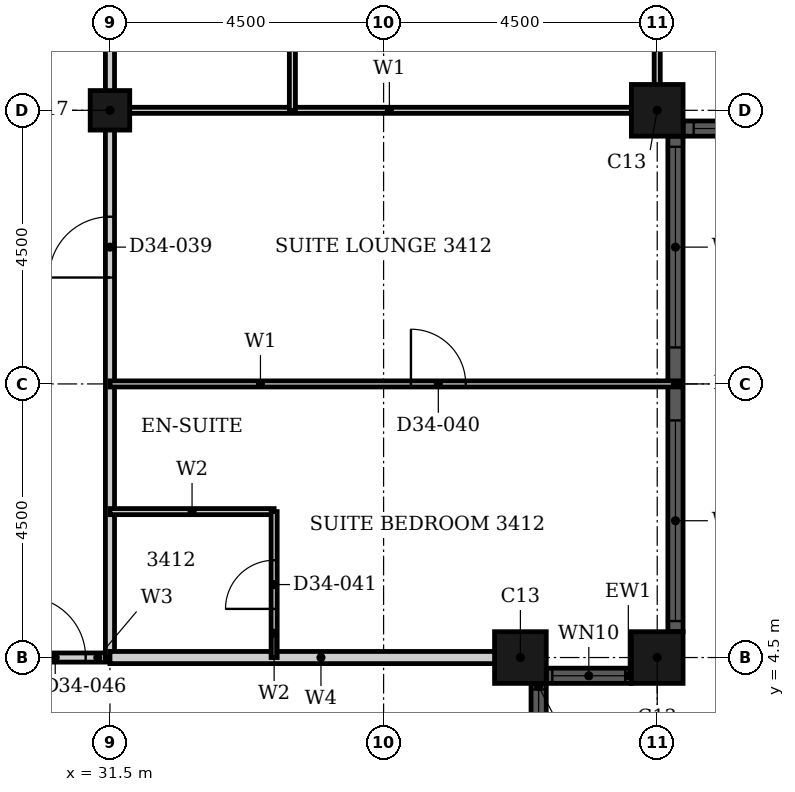
"""IFC4 building model, lengths in metres.
Left out: names, types, materials, properties, quantities, classifications, styles, units other than length and angle.
Written with IfcOpenShell. Run it as: python <this file> out.ifc"""

import sys

from ifc_helpers import new_model, si_unit, direction, frame, frame_2d, origin, origin_2d, place, context, subcontext, project, spatial, rectangle, hollow_rectangle, extrude, element, fill, save


model = new_model("IFC4")
c1 = context("Model", 3, precision=1e-05, world=origin(), true_north=direction((0.0, 1.0)))
c2 = subcontext(c1, "Body", "Model", "MODEL_VIEW")
j1 = project(units=[si_unit("LENGTHUNIT", "METRE"), si_unit("PLANEANGLEUNIT", "RADIAN")], contexts=[c1])
p1 = place(None, origin())
s1 = spatial("IfcSite", under=j1, at=p1, CompositionType="ELEMENT")
p2 = place(p1, origin())
s2 = spatial("IfcBuilding", under=s1, at=p2, CompositionType="ELEMENT")
p3 = place(p2, frame((0.0, 0.0, 136.8)))
s3 = spatial("IfcBuildingStorey", under=s2, at=p3, CompositionType="ELEMENT", Elevation=136.8)
for number, where, z_axis, x_axis in (
    (1, (38.25, 4.5, 0.0), (0.0, 0.0, 1.0), (1.0, 0.0, 0.0)),
    (2, (40.5, 4.5, 0.0), (0.0, 0.0, 1.0), (1.0, 0.0, 0.0)),
    (3, (40.5, 13.5, 0.0), (0.0, 0.0, 1.0), (1.0, 0.0, 0.0)),
):
    element("IfcColumn", number, at=place(p3, frame(where, z_axis=z_axis, x_axis=x_axis)), inside=s3, PredefinedType="COLUMN", context=c2, shape_type="SweptSolid", body=[
        extrude(hollow_rectangle(XDim=0.85, YDim=0.85, WallThickness=0.026, at=origin_2d()), origin(), (0.0, 0.0, 1.0), 3.6),
    ])
p4 = place(p3, frame((31.5, 13.5, 0.0), z_axis=(0.0, 0.0, 1.0), x_axis=(1.0, 0.0, 0.0)))
e4 = element("IfcColumn", 4, at=p4, inside=s3, PredefinedType="COLUMN", context=c2, shape_type="SweptSolid", body=[
    extrude(hollow_rectangle(XDim=0.65, YDim=0.65, WallThickness=0.021, at=origin_2d()), origin(), (0.0, 0.0, 1.0), 3.6),
])
p5 = place(p3, frame((38.55, 2.675, 0.0), z_axis=(0.0, 0.0, 1.0), x_axis=(0.0, 1.0, 0.0)))
e5 = element("IfcWall", 5, at=p5, inside=s3, PredefinedType="SOLIDWALL", context=c2, shape_type="SweptSolid", body=[
    extrude(rectangle(XDim=1.4, YDim=0.25, at=frame_2d((0.7, 0.0))), origin(), (0.0, 0.0, 1.0), 3.6),
])
p6 = place(p5, frame((0.1, 0.0, 0.9)))
e6 = element("IfcOpeningElement", 6, at=p6, cuts=e5, PredefinedType="OPENING", context=c2, shape_type="SweptSolid", body=[
    extrude(rectangle(XDim=1.2, YDim=1.85, at=frame_2d((0.6, 0.925))), frame((0.0, 0.135, 0.0), z_axis=(0.0, -1.0, 0.0), x_axis=(1.0, 0.0, 0.0)), (0.0, 0.0, 1.0), 0.27),
])
p7 = place(p3, frame((38.675, 4.2, 0.0), z_axis=(0.0, 0.0, 1.0), x_axis=(1.0, 0.0, 0.0)))
e7 = element("IfcWall", 7, at=p7, inside=s3, PredefinedType="SOLIDWALL", context=c2, shape_type="SweptSolid", body=[
    extrude(rectangle(XDim=1.4, YDim=0.25, at=frame_2d((0.7, 0.0))), origin(), (0.0, 0.0, 1.0), 3.6),
])
p8 = place(p7, frame((0.1, 0.0, 0.9)))
e8 = element("IfcOpeningElement", 8, at=p8, cuts=e7, PredefinedType="OPENING", context=c2, shape_type="SweptSolid", body=[
    extrude(rectangle(XDim=1.2, YDim=1.85, at=frame_2d((0.6, 0.925))), frame((0.0, 0.135, 0.0), z_axis=(0.0, -1.0, 0.0), x_axis=(1.0, 0.0, 0.0)), (0.0, 0.0, 1.0), 0.27),
])
p9 = place(p3, frame((40.8, 4.925, 0.0), z_axis=(0.0, 0.0, 1.0), x_axis=(0.0, 1.0, 0.0)))
e9 = element("IfcWall", 9, at=p9, inside=s3, PredefinedType="SOLIDWALL", context=c2, shape_type="SweptSolid", body=[
    extrude(rectangle(XDim=8.15, YDim=0.25, at=frame_2d((4.075, 0.0))), origin(), (0.0, 0.0, 1.0), 3.6),
])
p10 = place(p9, frame((0.175, 0.0, 0.9)))
e10 = element("IfcOpeningElement", 10, at=p10, cuts=e9, PredefinedType="OPENING", context=c2, shape_type="SweptSolid", body=[
    extrude(rectangle(XDim=3.3, YDim=1.85, at=frame_2d((1.65, 0.925))), frame((0.0, 0.135, 0.0), z_axis=(0.0, -1.0, 0.0), x_axis=(1.0, 0.0, 0.0)), (0.0, 0.0, 1.0), 0.27),
])
p11 = place(p9, frame((4.675, 0.0, 0.9)))
e11 = element("IfcOpeningElement", 11, at=p11, cuts=e9, PredefinedType="OPENING", context=c2, shape_type="SweptSolid", body=[
    extrude(rectangle(XDim=3.3, YDim=1.85, at=frame_2d((1.65, 0.925))), frame((0.0, 0.135, 0.0), z_axis=(0.0, -1.0, 0.0), x_axis=(1.0, 0.0, 0.0)), (0.0, 0.0, 1.0), 0.27),
])
p12 = place(p3, frame((40.925, 13.2, 0.0), z_axis=(0.0, 0.0, 1.0), x_axis=(1.0, 0.0, 0.0)))
e12 = element("IfcWall", 12, at=p12, inside=s3, PredefinedType="SOLIDWALL", context=c2, shape_type="SweptSolid", body=[
    extrude(rectangle(XDim=3.65, YDim=0.25, at=frame_2d((1.825, 0.0))), origin(), (0.0, 0.0, 1.0), 3.6),
])
p13 = place(p12, frame((0.175, 0.0, 0.9)))
e13 = element("IfcOpeningElement", 13, at=p13, cuts=e12, PredefinedType="OPENING", context=c2, shape_type="SweptSolid", body=[
    extrude(rectangle(XDim=3.3, YDim=1.85, at=frame_2d((1.65, 0.925))), frame((0.0, 0.135, 0.0), z_axis=(0.0, -1.0, 0.0), x_axis=(1.0, 0.0, 0.0)), (0.0, 0.0, 1.0), 0.27),
])
p14 = place(p3, frame((29.7, 4.5, 0.0), z_axis=(0.0, 0.0, 1.0), x_axis=(1.0, 0.0, 0.0)))
e14 = element("IfcWall", 14, at=p14, inside=s3, PredefinedType="PARTITIONING", context=c2, shape_type="SweptSolid", body=[
    extrude(rectangle(XDim=1.8, YDim=0.15, at=frame_2d((0.9, 0.0))), origin(), (0.0, 0.0, 1.0), 3.2),
])
p15 = place(p14, frame((0.4, 0.0, 0.0)))
e15 = element("IfcOpeningElement", 15, at=p15, cuts=e14, PredefinedType="OPENING", context=c2, shape_type="SweptSolid", body=[
    extrude(rectangle(XDim=1.0, YDim=2.1, at=frame_2d((0.5, 1.05))), frame((0.0, 0.085, 0.0), z_axis=(0.0, -1.0, 0.0), x_axis=(1.0, 0.0, 0.0)), (0.0, 0.0, 1.0), 0.17),
])
p16 = place(p3, frame((31.5, 4.5, 0.0), z_axis=(0.0, 0.0, 1.0), x_axis=(0.0, 1.0, 0.0)))
e16 = element("IfcWall", 16, at=p16, inside=s3, PredefinedType="PARTITIONING", context=c2, shape_type="SweptSolid", body=[
    extrude(rectangle(XDim=16.2, YDim=0.15, at=frame_2d((8.1, 0.0))), origin(), (0.0, 0.0, 1.0), 2.48),
])
p17 = place(p16, frame((6.25, 0.0, 0.0)))
e17 = element("IfcOpeningElement", 17, at=p17, cuts=e16, PredefinedType="OPENING", context=c2, shape_type="SweptSolid", body=[
    extrude(rectangle(XDim=1.0, YDim=2.1, at=frame_2d((0.5, 1.05))), frame((0.0, 0.085, 0.0), z_axis=(0.0, -1.0, 0.0), x_axis=(1.0, 0.0, 0.0)), (0.0, 0.0, 1.0), 0.17),
])
p18 = place(p3, frame((31.5, 13.5, 0.0), z_axis=(0.0, 0.0, 1.0), x_axis=(1.0, 0.0, 0.0)))
e18 = element("IfcWall", 18, at=p18, inside=s3, PredefinedType="PARTITIONING", context=c2, shape_type="SweptSolid", body=[
    extrude(rectangle(XDim=9.19, YDim=0.1, at=frame_2d((4.595, 0.0))), origin(), (0.0, 0.0, 1.0), 2.28),
])
p19 = place(p3, frame((31.5, 9.0, 0.0), z_axis=(0.0, 0.0, 1.0), x_axis=(1.0, 0.0, 0.0)))
e19 = element("IfcWall", 19, at=p19, inside=s3, PredefinedType="PARTITIONING", context=c2, shape_type="SweptSolid", body=[
    extrude(rectangle(XDim=9.365, YDim=0.1, at=frame_2d((4.683, 0.0))), origin(), (0.0, 0.0, 1.0), 3.2),
])
p20 = place(p19, frame((4.95, 0.0, 0.0)))
e20 = element("IfcOpeningElement", 20, at=p20, cuts=e19, PredefinedType="OPENING", context=c2, shape_type="SweptSolid", body=[
    extrude(rectangle(XDim=0.9, YDim=2.1, at=frame_2d((0.45, 1.05))), frame((0.0, 0.06, 0.0), z_axis=(0.0, -1.0, 0.0), x_axis=(1.0, 0.0, 0.0)), (0.0, 0.0, 1.0), 0.12),
])
p21 = place(p3, frame((34.5, 13.5, 0.0), z_axis=(0.0, 0.0, 1.0), x_axis=(0.0, 1.0, 0.0)))
e21 = element("IfcWall", 21, at=p21, inside=s3, PredefinedType="PARTITIONING", context=c2, shape_type="SweptSolid", body=[
    extrude(rectangle(XDim=7.2, YDim=0.1, at=frame_2d((3.6, 0.0))), origin(), (0.0, 0.0, 1.0), 3.2),
])
p22 = place(p3, frame((40.5, 13.31, 0.0), z_axis=(0.0, 0.0, 1.0), x_axis=(0.0, 1.0, 0.0)))
e22 = element("IfcWall", 22, at=p22, inside=s3, PredefinedType="PARTITIONING", context=c2, shape_type="SweptSolid", body=[
    extrude(rectangle(XDim=7.39, YDim=0.1, at=frame_2d((3.695, 0.0))), origin(), (0.0, 0.0, 1.0), 3.2),
])
p23 = place(p3, frame((31.5, 4.5, 0.0), z_axis=(0.0, 0.0, 1.0), x_axis=(1.0, 0.0, 0.0)))
e23 = element("IfcWall", 23, at=p23, inside=s3, PredefinedType="PARTITIONING", context=c2, shape_type="SweptSolid", body=[
    extrude(rectangle(XDim=6.94, YDim=0.2, at=frame_2d((3.47, 0.0))), origin(), (0.0, 0.0, 1.0), 3.2),
])
p24 = place(p3, frame((31.5, 6.9, 0.0), z_axis=(0.0, 0.0, 1.0), x_axis=(1.0, 0.0, 0.0)))
e24 = element("IfcWall", 24, at=p24, inside=s3, PredefinedType="PARTITIONING", context=c2, shape_type="SweptSolid", body=[
    extrude(rectangle(XDim=2.7, YDim=0.1, at=frame_2d((1.35, 0.0))), origin(), (0.0, 0.0, 1.0), 3.2),
])
p25 = place(p3, frame((34.2, 4.5, 0.0), z_axis=(0.0, 0.0, 1.0), x_axis=(0.0, 1.0, 0.0)))
e25 = element("IfcWall", 25, at=p25, inside=s3, PredefinedType="PARTITIONING", context=c2, shape_type="SweptSolid", body=[
    extrude(rectangle(XDim=2.4, YDim=0.1, at=frame_2d((1.2, 0.0))), origin(), (0.0, 0.0, 1.0), 3.2),
])
p26 = place(p25, frame((0.8, 0.0, 0.0)))
e26 = element("IfcOpeningElement", 26, at=p26, cuts=e25, PredefinedType="OPENING", context=c2, shape_type="SweptSolid", body=[
    extrude(rectangle(XDim=0.8, YDim=2.1, at=frame_2d((0.4, 1.05))), frame((0.0, 0.06, 0.0), z_axis=(0.0, -1.0, 0.0), x_axis=(1.0, 0.0, 0.0)), (0.0, 0.0, 1.0), 0.12),
])
p27 = place(p6, origin())
e27 = element("IfcWindow", 27, at=p27, inside=s3, PartitioningType="SINGLE_PANEL", PredefinedType="WINDOW", context=c2, shape_type="SweptSolid", body=[
    extrude(rectangle(XDim=1.2, YDim=1.85, at=frame_2d((0.6, 0.925))), frame((0.0, 0.03, 0.0), z_axis=(0.0, -1.0, 0.0), x_axis=(1.0, 0.0, 0.0)), (0.0, 0.0, 1.0), 0.06),
])
fill(e6, e27)
p28 = place(p8, origin())
e28 = element("IfcWindow", 28, at=p28, inside=s3, PartitioningType="SINGLE_PANEL", PredefinedType="WINDOW", context=c2, shape_type="SweptSolid", body=[
    extrude(rectangle(XDim=1.2, YDim=1.85, at=frame_2d((0.6, 0.925))), frame((0.0, 0.03, 0.0), z_axis=(0.0, -1.0, 0.0), x_axis=(1.0, 0.0, 0.0)), (0.0, 0.0, 1.0), 0.06),
])
fill(e8, e28)
p29 = place(p10, origin())
e29 = element("IfcWindow", 29, at=p29, inside=s3, PartitioningType="SINGLE_PANEL", PredefinedType="WINDOW", context=c2, shape_type="SweptSolid", body=[
    extrude(rectangle(XDim=3.3, YDim=1.85, at=frame_2d((1.65, 0.925))), frame((0.0, 0.03, 0.0), z_axis=(0.0, -1.0, 0.0), x_axis=(1.0, 0.0, 0.0)), (0.0, 0.0, 1.0), 0.06),
])
fill(e10, e29)
p30 = place(p11, origin())
e30 = element("IfcWindow", 30, at=p30, inside=s3, PartitioningType="SINGLE_PANEL", PredefinedType="WINDOW", context=c2, shape_type="SweptSolid", body=[
    extrude(rectangle(XDim=3.3, YDim=1.85, at=frame_2d((1.65, 0.925))), frame((0.0, 0.03, 0.0), z_axis=(0.0, -1.0, 0.0), x_axis=(1.0, 0.0, 0.0)), (0.0, 0.0, 1.0), 0.06),
])
fill(e11, e30)
p31 = place(p13, origin())
e31 = element("IfcWindow", 31, at=p31, inside=s3, PartitioningType="SINGLE_PANEL", PredefinedType="WINDOW", context=c2, shape_type="SweptSolid", body=[
    extrude(rectangle(XDim=3.3, YDim=1.85, at=frame_2d((1.65, 0.925))), frame((0.0, 0.03, 0.0), z_axis=(0.0, -1.0, 0.0), x_axis=(1.0, 0.0, 0.0)), (0.0, 0.0, 1.0), 0.06),
])
fill(e13, e31)
p32 = place(p17, origin())
e32 = element("IfcDoor", 32, at=p32, inside=s3, OperationType="SINGLE_SWING_RIGHT", PredefinedType="DOOR", context=c2, shape_type="SweptSolid", body=[
    extrude(rectangle(XDim=1.0, YDim=2.1, at=frame_2d((0.5, 1.05))), frame((0.0, 0.025, 0.0), z_axis=(0.0, -1.0, 0.0), x_axis=(1.0, 0.0, 0.0)), (0.0, 0.0, 1.0), 0.05),
])
fill(e17, e32)
p33 = place(p20, origin())
e33 = element("IfcDoor", 33, at=p33, inside=s3, OperationType="SINGLE_SWING_RIGHT", PredefinedType="DOOR", context=c2, shape_type="SweptSolid", body=[
    extrude(rectangle(XDim=0.9, YDim=2.1, at=frame_2d((0.45, 1.05))), frame((0.0, 0.025, 0.0), z_axis=(0.0, -1.0, 0.0), x_axis=(1.0, 0.0, 0.0)), (0.0, 0.0, 1.0), 0.05),
])
fill(e20, e33)
p34 = place(p26, origin())
e34 = element("IfcDoor", 34, at=p34, inside=s3, OperationType="SINGLE_SWING_LEFT", PredefinedType="DOOR", context=c2, shape_type="SweptSolid", body=[
    extrude(rectangle(XDim=0.8, YDim=2.1, at=frame_2d((0.4, 1.05))), frame((0.0, 0.025, 0.0), z_axis=(0.0, -1.0, 0.0), x_axis=(1.0, 0.0, 0.0)), (0.0, 0.0, 1.0), 0.05),
])
fill(e26, e34)
p35 = place(p15, origin())
e35 = element("IfcDoor", 35, at=p35, inside=s3, OperationType="SINGLE_SWING_RIGHT", PredefinedType="DOOR", context=c2, shape_type="SweptSolid", body=[
    extrude(rectangle(XDim=1.0, YDim=2.1, at=frame_2d((0.5, 1.05))), frame((0.0, 0.025, 0.0), z_axis=(0.0, -1.0, 0.0), x_axis=(1.0, 0.0, 0.0)), (0.0, 0.0, 1.0), 0.05),
])
fill(e15, e35)
save(model, sys.argv[1])
